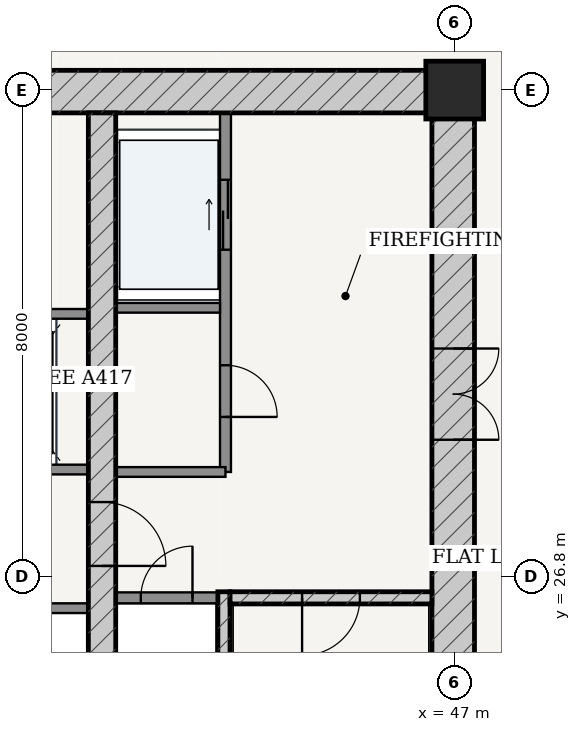
"""IFC4 building model, lengths in metres.
Left out: names, types, materials, properties, quantities, classifications, styles, units other than length and angle.
Written with IfcOpenShell. Run it as: python <this file> out.ifc"""

import sys

from ifc_helpers import new_model, si_unit, direction, frame, frame_2d, origin, origin_2d, place, context, subcontext, project, spatial, rectangle, extrude, source, transform, mapped, element, fill, save


model = new_model("IFC4")
c1 = context("Model", 3, precision=1e-05, world=origin(), true_north=direction((-0.2419218956, 0.970295726276)))
c2 = subcontext(c1, "Body", "Model", "MODEL_VIEW")
j1 = project(units=[si_unit("LENGTHUNIT", "METRE"), si_unit("PLANEANGLEUNIT", "RADIAN")], contexts=[c1])
p1 = place(None, origin())
s1 = spatial("IfcSite", under=j1, at=p1, CompositionType="ELEMENT")
p2 = place(p1, origin())
s2 = spatial("IfcBuilding", under=s1, at=p2, CompositionType="ELEMENT")
p3 = place(p2, frame((0.0, 0.0, 101.4)))
s3 = spatial("IfcBuildingStorey", under=s2, at=p3, CompositionType="ELEMENT", Elevation=101.4)
p4 = place(p3, frame((47.0, 34.8, 0.0), z_axis=(0.0, 0.0, 1.0), x_axis=(1.0, 0.0, 0.0)))
e1 = element("IfcColumn", 1, at=p4, inside=s3, PredefinedType="COLUMN", context=c2, shape_type="SweptSolid", body=[
    extrude(rectangle(XDim=0.95, YDim=0.95, at=origin_2d()), origin(), (0.0, 0.0, 1.0), 3.6),
])
p5 = place(p3, frame((28.675, 34.775, 0.0), z_axis=(0.0, 0.0, 1.0), x_axis=(1.0, 0.0, 0.0)))
e2 = element("IfcWall", 2, at=p5, inside=s3, PredefinedType="SHEAR", context=c2, shape_type="SweptSolid", body=[
    extrude(rectangle(XDim=18.65, YDim=0.7, at=frame_2d((9.325, 0.0))), origin(), (0.0, 0.0, 1.0), 3.325),
])
p6 = place(p5, frame((7.357, 0.0, 0.0)))
e3 = element("IfcOpeningElement", 3, at=p6, cuts=e2, PredefinedType="OPENING", context=c2, shape_type="SweptSolid", body=[
    extrude(rectangle(XDim=0.86, YDim=2.1, at=frame_2d((0.43, 1.05))), frame((0.0, 0.36, 0.0), z_axis=(0.0, -1.0, 0.0), x_axis=(1.0, 0.0, 0.0)), (0.0, 0.0, 1.0), 0.72),
])
p7 = place(p5, frame((10.438, 0.0, 0.0)))
e4 = element("IfcOpeningElement", 4, at=p7, cuts=e2, PredefinedType="OPENING", context=c2, shape_type="SweptSolid", body=[
    extrude(rectangle(XDim=0.85, YDim=2.1, at=frame_2d((0.425, 1.05))), frame((0.0, 0.36, 0.0), z_axis=(0.0, -1.0, 0.0), x_axis=(1.0, 0.0, 0.0)), (0.0, 0.0, 1.0), 0.72),
])
p8 = place(p3, frame((46.975, 19.175, 0.0), z_axis=(0.0, 0.0, 1.0), x_axis=(0.0, 1.0, 0.0)))
e5 = element("IfcWall", 5, at=p8, inside=s3, PredefinedType="SHEAR", context=c2, shape_type="SweptSolid", body=[
    extrude(rectangle(XDim=15.25, YDim=0.7, at=frame_2d((7.625, 0.0))), origin(), (0.0, 0.0, 1.0), 3.325),
])
p9 = place(p8, frame((9.875, 0.0, 0.0)))
e6 = element("IfcOpeningElement", 6, at=p9, cuts=e5, PredefinedType="OPENING", context=c2, shape_type="SweptSolid", body=[
    extrude(rectangle(XDim=1.5, YDim=2.2, at=frame_2d((0.75, 1.1))), frame((0.0, 0.36, 0.0), z_axis=(0.0, -1.0, 0.0), x_axis=(1.0, 0.0, 0.0)), (0.0, 0.0, 1.0), 0.72),
])
p10 = place(p3, frame((43.205, 19.175, 0.0), z_axis=(0.0, 0.0, 1.0), x_axis=(0.0, 1.0, 0.0)))
e7 = element("IfcWall", 7, at=p10, inside=s3, PredefinedType="SOLIDWALL", context=c2, shape_type="SweptSolid", body=[
    extrude(rectangle(XDim=7.375, YDim=0.2, at=frame_2d((3.688, 0.0))), origin(), (0.0, 0.0, 1.0), 3.325),
])
p11 = place(p3, frame((43.305, 26.45, 0.0), z_axis=(0.0, 0.0, 1.0), x_axis=(1.0, 0.0, 0.0)))
e8 = element("IfcWall", 8, at=p11, inside=s3, PredefinedType="SOLIDWALL", context=c2, shape_type="SweptSolid", body=[
    extrude(rectangle(XDim=3.32, YDim=0.2, at=frame_2d((1.66, 0.0))), origin(), (0.0, 0.0, 1.0), 3.325),
])
p12 = place(p11, frame((1.185, 0.0, 0.0)))
e9 = element("IfcOpeningElement", 9, at=p12, cuts=e8, PredefinedType="OPENING", context=c2, shape_type="SweptSolid", body=[
    extrude(rectangle(XDim=0.95, YDim=2.15, at=frame_2d((0.475, 1.075))), frame((0.0, 0.11, 0.0), z_axis=(0.0, -1.0, 0.0), x_axis=(1.0, 0.0, 0.0)), (0.0, 0.0, 1.0), 0.22),
])
p13 = place(p3, frame((41.2, 19.175, 0.0), z_axis=(0.0, 0.0, 1.0), x_axis=(0.0, 1.0, 0.0)))
e10 = element("IfcWall", 10, at=p13, inside=s3, PredefinedType="SHEAR", context=c2, shape_type="SweptSolid", body=[
    extrude(rectangle(XDim=15.25, YDim=0.45, at=frame_2d((7.625, 0.0))), origin(), (0.0, 0.0, 1.0), 3.325),
])
p14 = place(p13, frame((7.8, 0.0, 0.0)))
e11 = element("IfcOpeningElement", 11, at=p14, cuts=e10, PredefinedType="OPENING", context=c2, shape_type="SweptSolid", body=[
    extrude(rectangle(XDim=1.05, YDim=2.15, at=frame_2d((0.525, 1.075))), frame((0.0, 0.235, 0.0), z_axis=(0.0, -1.0, 0.0), x_axis=(1.0, 0.0, 0.0)), (0.0, 0.0, 1.0), 0.47),
])
p15 = place(p3, frame((41.425, 26.45, 0.0), z_axis=(0.0, 0.0, 1.0), x_axis=(1.0, 0.0, 0.0)))
e12 = element("IfcWall", 12, at=p15, inside=s3, PredefinedType="PARTITIONING", context=c2, shape_type="SweptSolid", body=[
    extrude(rectangle(XDim=1.675, YDim=0.18, at=frame_2d((0.837, 0.0))), origin(), (0.0, 0.0, 1.0), 3.325),
])
p16 = place(p15, frame((0.413, 0.0, 0.0)))
e13 = element("IfcOpeningElement", 13, at=p16, cuts=e12, PredefinedType="OPENING", context=c2, shape_type="SweptSolid", body=[
    extrude(rectangle(XDim=0.85, YDim=2.1, at=frame_2d((0.425, 1.05))), frame((0.0, 0.1, 0.0), z_axis=(0.0, -1.0, 0.0), x_axis=(1.0, 0.0, 0.0)), (0.0, 0.0, 1.0), 0.2),
])
p17 = place(p3, frame((43.23, 28.52, 0.0), z_axis=(0.0, 0.0, 1.0), x_axis=(0.0, 1.0, 0.0)))
e14 = element("IfcWall", 14, at=p17, inside=s3, PredefinedType="PARTITIONING", context=c2, shape_type="SweptSolid", body=[
    extrude(rectangle(XDim=5.905, YDim=0.18, at=frame_2d((2.953, 0.0))), origin(), (0.0, 0.0, 1.0), 3.325),
])
p18 = place(p17, frame((0.905, 0.0, 0.0)))
e15 = element("IfcOpeningElement", 15, at=p18, cuts=e14, PredefinedType="OPENING", context=c2, shape_type="SweptSolid", body=[
    extrude(rectangle(XDim=0.85, YDim=2.1, at=frame_2d((0.425, 1.05))), frame((0.0, 0.1, 0.0), z_axis=(0.0, -1.0, 0.0), x_axis=(1.0, 0.0, 0.0)), (0.0, 0.0, 1.0), 0.2),
])
p19 = place(p17, frame((3.655, 0.0, 0.0)))
e16 = element("IfcOpeningElement", 16, at=p19, cuts=e14, PredefinedType="OPENING", context=c2, shape_type="SweptSolid", body=[
    extrude(rectangle(XDim=1.15, YDim=2.2, at=frame_2d((0.575, 1.1))), frame((0.0, 0.1, 0.0), z_axis=(0.0, -1.0, 0.0), x_axis=(1.0, 0.0, 0.0)), (0.0, 0.0, 1.0), 0.2),
])
p20 = place(p3, frame((41.425, 31.22, 0.0), z_axis=(0.0, 0.0, 1.0), x_axis=(1.0, 0.0, 0.0)))
e17 = element("IfcWall", 17, at=p20, inside=s3, PredefinedType="PARTITIONING", context=c2, shape_type="SweptSolid", body=[
    extrude(rectangle(XDim=1.715, YDim=0.16, at=frame_2d((0.857, 0.0))), origin(), (0.0, 0.0, 1.0), 3.325),
])
p21 = place(p3, frame((41.425, 28.52, 0.0), z_axis=(0.0, 0.0, 1.0), x_axis=(1.0, 0.0, 0.0)))
e18 = element("IfcWall", 18, at=p21, inside=s3, PredefinedType="PARTITIONING", context=c2, shape_type="SweptSolid", body=[
    extrude(rectangle(XDim=1.805, YDim=0.16, at=frame_2d((0.902, 0.0))), origin(), (0.0, 0.0, 1.0), 3.325),
])
p22 = place(p3, frame((35.025, 28.56, 0.0), z_axis=(0.0, 0.0, 1.0), x_axis=(1.0, 0.0, 0.0)))
e19 = element("IfcWall", 19, at=p22, inside=s3, PredefinedType="PARTITIONING", context=c2, shape_type="SweptSolid", body=[
    extrude(rectangle(XDim=5.95, YDim=0.16, at=frame_2d((2.975, 0.0))), origin(), (0.0, 0.0, 1.0), 3.325),
])
p23 = place(p22, frame((0.76, 0.0, 0.0)))
e20 = element("IfcOpeningElement", 20, at=p23, cuts=e19, PredefinedType="OPENING", context=c2, shape_type="SweptSolid", body=[
    extrude(rectangle(XDim=1.1, YDim=2.2, at=frame_2d((0.55, 1.1))), frame((0.0, 0.09, 0.0), z_axis=(0.0, -1.0, 0.0), x_axis=(1.0, 0.0, 0.0)), (0.0, 0.0, 1.0), 0.18),
])
p24 = place(p22, frame((2.425, 0.0, 0.0)))
e21 = element("IfcOpeningElement", 21, at=p24, cuts=e19, PredefinedType="OPENING", context=c2, shape_type="SweptSolid", body=[
    extrude(rectangle(XDim=1.1, YDim=2.2, at=frame_2d((0.55, 1.1))), frame((0.0, 0.09, 0.0), z_axis=(0.0, -1.0, 0.0), x_axis=(1.0, 0.0, 0.0)), (0.0, 0.0, 1.0), 0.18),
])
p25 = place(p22, frame((4.09, 0.0, 0.0)))
e22 = element("IfcOpeningElement", 22, at=p25, cuts=e19, PredefinedType="OPENING", context=c2, shape_type="SweptSolid", body=[
    extrude(rectangle(XDim=1.1, YDim=2.2, at=frame_2d((0.55, 1.1))), frame((0.0, 0.09, 0.0), z_axis=(0.0, -1.0, 0.0), x_axis=(1.0, 0.0, 0.0)), (0.0, 0.0, 1.0), 0.18),
])
for number, where, z_axis, x_axis in (
    (23, (35.025, 31.12, 0.0), (0.0, 0.0, 1.0), (1.0, 0.0, 0.0)),
    (24, (35.025, 26.28, 0.0), (0.0, 0.0, 1.0), (1.0, 0.0, 0.0)),
):
    element("IfcWall", number, at=place(p3, frame(where, z_axis=z_axis, x_axis=x_axis)), inside=s3, PredefinedType="PARTITIONING", context=c2, shape_type="SweptSolid", body=[
        extrude(rectangle(XDim=5.95, YDim=0.16, at=frame_2d((2.975, 0.0))), origin(), (0.0, 0.0, 1.0), 3.325),
    ])
m1 = source(origin(), c2, "Body", "SweptSolid", [
    extrude(rectangle(XDim=1.5, YDim=2.2, at=frame_2d((0.75, 1.1))), frame((0.0, 0.025, 0.0), z_axis=(0.0, -1.0, 0.0), x_axis=(1.0, 0.0, 0.0)), (0.0, 0.0, 1.0), 0.05),
])
p26 = place(p9, frame((1.5, 0.0, 0.0), z_axis=(0.0, 0.0, 1.0), x_axis=(-1.0, 0.0, 0.0)))
e25 = element("IfcDoor", 25, at=p26, inside=s3, OperationType="DOUBLE_DOOR_SINGLE_SWING", PredefinedType="DOOR", context=c2, shape_type="MappedRepresentation", body=[
    mapped(m1, transform((0.0, 0.0, 0.0), scale=1.0)),
])
fill(e6, e25)
m2 = source(origin(), c2, "Body", "SweptSolid", [
    extrude(rectangle(XDim=1.05, YDim=2.15, at=frame_2d((0.525, 1.075))), frame((0.0, 0.025, 0.0), z_axis=(0.0, -1.0, 0.0), x_axis=(1.0, 0.0, 0.0)), (0.0, 0.0, 1.0), 0.05),
])
p27 = place(p14, frame((1.05, 0.0, 0.0), z_axis=(0.0, 0.0, 1.0), x_axis=(-1.0, 0.0, 0.0)))
e26 = element("IfcDoor", 26, at=p27, inside=s3, OperationType="SINGLE_SWING_RIGHT", PredefinedType="DOOR", context=c2, shape_type="MappedRepresentation", body=[
    mapped(m2, transform((0.0, 0.0, 0.0), scale=1.0)),
])
fill(e11, e26)
m3 = source(origin(), c2, "Body", "SweptSolid", [
    extrude(rectangle(XDim=0.95, YDim=2.15, at=frame_2d((0.475, 1.075))), frame((0.0, 0.025, 0.0), z_axis=(0.0, -1.0, 0.0), x_axis=(1.0, 0.0, 0.0)), (0.0, 0.0, 1.0), 0.05),
])
p28 = place(p12, frame((0.95, 0.0, 0.0), z_axis=(0.0, 0.0, 1.0), x_axis=(-1.0, 0.0, 0.0)))
e27 = element("IfcDoor", 27, at=p28, inside=s3, OperationType="SINGLE_SWING_RIGHT", PredefinedType="DOOR", context=c2, shape_type="MappedRepresentation", body=[
    mapped(m3, transform((0.0, 0.0, 0.0), scale=1.0)),
])
fill(e9, e27)
m4 = source(origin(), c2, "Body", "SweptSolid", [
    extrude(rectangle(XDim=0.85, YDim=2.1, at=frame_2d((0.425, 1.05))), frame((0.0, 0.025, 0.0), z_axis=(0.0, -1.0, 0.0), x_axis=(1.0, 0.0, 0.0)), (0.0, 0.0, 1.0), 0.05),
])
p29 = place(p16, origin())
e28 = element("IfcDoor", 28, at=p29, inside=s3, OperationType="SINGLE_SWING_RIGHT", PredefinedType="DOOR", context=c2, shape_type="MappedRepresentation", body=[
    mapped(m4, transform((0.0, 0.0, 0.0), scale=1.0)),
])
fill(e13, e28)
p30 = place(p18, frame((0.85, 0.0, 0.0), z_axis=(0.0, 0.0, 1.0), x_axis=(-1.0, 0.0, 0.0)))
e29 = element("IfcDoor", 29, at=p30, inside=s3, OperationType="SINGLE_SWING_RIGHT", PredefinedType="DOOR", context=c2, shape_type="MappedRepresentation", body=[
    mapped(m4, transform((0.0, 0.0, 0.0), scale=1.0)),
])
fill(e15, e29)
m5 = source(origin(), c2, "Body", "SweptSolid", [
    extrude(rectangle(XDim=1.15, YDim=2.2, at=frame_2d((0.575, 1.1))), frame((0.0, 0.025, 0.0), z_axis=(0.0, -1.0, 0.0), x_axis=(1.0, 0.0, 0.0)), (0.0, 0.0, 1.0), 0.05),
])
p31 = place(p19, origin())
e30 = element("IfcDoor", 30, at=p31, inside=s3, OperationType="DOUBLE_DOOR_SLIDING", PredefinedType="DOOR", context=c2, shape_type="MappedRepresentation", body=[
    mapped(m5, transform((0.0, 0.0, 0.0), scale=1.0)),
])
fill(e16, e30)
save(model, sys.argv[1])
